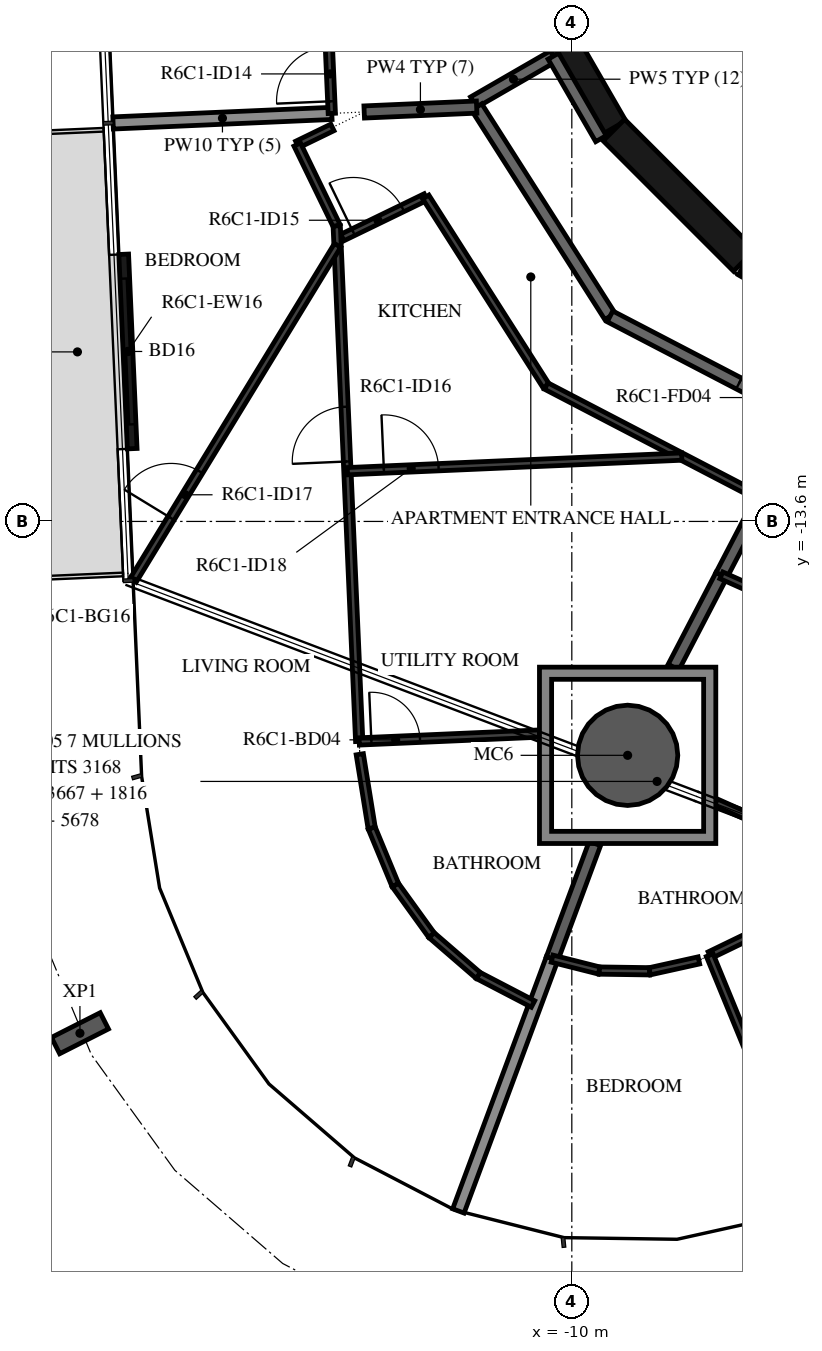
"""IFC4 building model, lengths in metres.
Left out: names, types, materials, properties, quantities, classifications, styles, units other than length and angle.
Written with IfcOpenShell. Run it as: python <this file> out.ifc"""

import sys

from ifc_helpers import new_model, si_unit, direction, frame, frame_2d, origin, origin_2d, place, context, subcontext, project, spatial, polyline, rectangle, hollow_circle, i_section, outline, extrude, element, fill, save


model = new_model("IFC4")
c1 = context("Model", 3, precision=1e-05, world=origin(), true_north=direction((0.0, 1.0)))
c2 = subcontext(c1, "Body", "Model", "MODEL_VIEW")
j1 = project(units=[si_unit("LENGTHUNIT", "METRE"), si_unit("PLANEANGLEUNIT", "RADIAN")], contexts=[c1])
p1 = place(None, origin())
s1 = spatial("IfcSite", under=j1, at=p1, CompositionType="ELEMENT")
p2 = place(p1, origin())
s2 = spatial("IfcBuilding", under=s1, at=p2, CompositionType="ELEMENT")
p3 = place(p2, frame((0.0, 0.0, 251.2)))
s3 = spatial("IfcBuildingStorey", under=s2, at=p3, CompositionType="ELEMENT", Elevation=251.2)
p4 = place(p3, frame((-9.082, -17.446, -0.38), z_axis=(0.0, 0.0, 1.0), x_axis=(1.0, 0.0, 0.0)))
e1 = element("IfcColumn", 1, at=p4, inside=s3, PredefinedType="COLUMN", context=c2, shape_type="SweptSolid", body=[
    extrude(hollow_circle(Radius=0.825, WallThickness=0.04, at=origin_2d()), origin(), (0.0, 0.0, 1.0), 3.5),
])
p5 = place(p3, frame((-18.089, -22.016, -0.38), z_axis=(0.0, 0.0, 1.0), x_axis=(-0.452473836659, 0.89177767809, 0.0)))
e2 = element("IfcColumn", 2, at=p5, inside=s3, PredefinedType="COLUMN", context=c2, shape_type="SweptSolid", body=[
    extrude(i_section(OverallWidth=0.3, OverallDepth=0.9, WebThickness=0.019, FlangeThickness=0.035, FilletRadius=0.03, at=origin_2d()), origin(), (0.0, 0.0, 1.0), 3.5),
])
p6 = place(p3, frame((-17.369, -9.207, 0.0), z_axis=(0.0, 0.0, 1.0), x_axis=(0.043639181999, -0.999047357133, 0.0)))
e3 = element("IfcWall", 3, at=p6, inside=s3, PredefinedType="STANDARD", context=c2, shape_type="SweptSolid", body=[
    extrude(rectangle(XDim=3.2, YDim=0.16, at=frame_2d((1.6, 0.0))), origin(), (0.0, 0.0, 1.0), 3.12),
])
p7 = place(p6, frame((0.4, 0.0, 0.0)))
e4 = element("IfcOpeningElement", 4, at=p7, cuts=e3, PredefinedType="OPENING", context=c2, shape_type="SweptSolid", body=[
    extrude(rectangle(XDim=2.4, YDim=2.4, at=frame_2d((1.2, 1.2))), frame((0.0, 0.09, 0.0), z_axis=(0.0, -1.0, 0.0), x_axis=(1.0, 0.0, 0.0)), (0.0, 0.0, 1.0), 0.18),
])
p8 = place(p3, frame((-10.845, -4.51, 0.0), z_axis=(0.0, 0.0, 1.0), x_axis=(0.500087131594, -0.865975092491, 0.0)))
e5 = element("IfcWall", 5, at=p8, inside=s3, PredefinedType="SHEAR", context=c2, shape_type="SweptSolid", body=[
    extrude(rectangle(XDim=3.033, YDim=0.5, at=frame_2d((1.516, 0.0))), origin(), (0.0, 0.0, 1.0), 3.12),
])
p9 = place(p3, frame((-9.308, -7.164, 0.0), z_axis=(0.0, 0.0, 1.0), x_axis=(0.707106781187, -0.707106781187, 0.0)))
e6 = element("IfcWall", 6, at=p9, inside=s3, PredefinedType="SHEAR", context=c2, shape_type="SweptSolid", body=[
    extrude(rectangle(XDim=3.032, YDim=0.5, at=frame_2d((1.516, 0.0))), origin(), (0.0, 0.0, 1.0), 3.12),
])
p10 = place(p3, frame((-7.137, -9.329, 0.0), z_axis=(0.0, 0.0, 1.0), x_axis=(0.865975092491, -0.500087131594, 0.0)))
e7 = element("IfcWall", 7, at=p10, inside=s3, PredefinedType="SHEAR", context=c2, shape_type="SweptSolid", body=[
    extrude(rectangle(XDim=3.033, YDim=0.5, at=frame_2d((1.516, 0.0))), origin(), (0.0, 0.0, 1.0), 3.12),
])
p11 = place(p3, frame((-10.303, -5.949, 0.0), z_axis=(0.0, 0.0, 1.0), x_axis=(-0.866043382451, -0.499968858743, 0.0)))
e8 = element("IfcWall", 8, at=p11, inside=s3, PredefinedType="STANDARD", context=c2, shape_type="SweptSolid", body=[
    extrude(rectangle(XDim=1.515, YDim=0.2, at=frame_2d((0.758, 0.0))), origin(), (0.0, 0.0, 1.0), 3.12),
])
p12 = place(p3, frame((-9.52, -7.305, 0.0), z_axis=(0.0, 0.0, 1.0), x_axis=(-0.500028278809, 0.866009076391, 0.0)))
e9 = element("IfcWall", 9, at=p12, inside=s3, PredefinedType="STANDARD", context=c2, shape_type="SweptSolid", body=[
    extrude(rectangle(XDim=1.566, YDim=0.2, at=frame_2d((0.783, 0.0))), origin(), (0.0, 0.0, 1.0), 3.12),
])
p13 = place(p3, frame((-11.565, -6.786, 0.0), z_axis=(0.0, 0.0, 1.0), x_axis=(0.537297327359, -0.843392898958, 0.0)))
e10 = element("IfcWall", 10, at=p13, inside=s3, PredefinedType="STANDARD", context=c2, shape_type="SweptSolid", body=[
    extrude(rectangle(XDim=4.081, YDim=0.2, at=frame_2d((2.041, 0.0))), origin(), (0.0, 0.0, 1.0), 3.12),
])
p14 = place(p3, frame((-9.372, -10.228, 0.0), z_axis=(0.0, 0.0, 1.0), x_axis=(0.887005184532, -0.461759464021, 0.0)))
e11 = element("IfcWall", 11, at=p14, inside=s3, PredefinedType="STANDARD", context=c2, shape_type="SweptSolid", body=[
    extrude(rectangle(XDim=7.181, YDim=0.2, at=frame_2d((3.591, 0.0))), origin(), (0.0, 0.0, 1.0), 3.12),
])
p15 = place(p14, frame((2.391, 0.0, 0.0)))
e12 = element("IfcOpeningElement", 12, at=p15, cuts=e11, PredefinedType="OPENING", context=c2, shape_type="SweptSolid", body=[
    extrude(rectangle(XDim=1.0, YDim=2.1, at=frame_2d((0.5, 1.05))), frame((0.0, 0.11, 0.0), z_axis=(0.0, -1.0, 0.0), x_axis=(1.0, 0.0, 0.0)), (0.0, 0.0, 1.0), 0.22),
])
p16 = place(p3, frame((-17.544, -7.047, 0.0), z_axis=(0.0, 0.0, 1.0), x_axis=(0.999045894436, 0.043672655174, 0.0)))
e13 = element("IfcWall", 13, at=p16, inside=s3, PredefinedType="STANDARD", context=c2, shape_type="SweptSolid", body=[
    extrude(rectangle(XDim=3.6, YDim=0.2, at=frame_2d((1.8, 0.0))), origin(), (0.0, 0.0, 1.0), 2.73),
])
p17 = place(p3, frame((-13.414, -6.867, 0.0), z_axis=(0.0, 0.0, 1.0), x_axis=(0.999046427216, 0.043660465726, 0.0)))
e14 = element("IfcWall", 14, at=p17, inside=s3, PredefinedType="STANDARD", context=c2, shape_type="SweptSolid", body=[
    extrude(rectangle(XDim=1.851, YDim=0.2, at=frame_2d((0.925, 0.0))), origin(), (0.0, 0.0, 1.0), 3.12),
])
p18 = place(p3, frame((-7.541, -14.486, 0.0), z_axis=(0.0, 0.0, 1.0), x_axis=(0.461746051786, 0.88701216658, 0.0)))
e15 = element("IfcWall", 15, at=p18, inside=s3, PredefinedType="STANDARD", context=c2, shape_type="SweptSolid", body=[
    extrude(rectangle(XDim=2.931, YDim=0.2, at=frame_2d((1.466, 0.0))), origin(), (0.0, 0.0, 1.0), 3.12),
])
p19 = place(p3, frame((-11.865, -24.939, 0.0), z_axis=(0.0, 0.0, 1.0), x_axis=(0.348214227297, 0.937414983829, 0.0)))
e16 = element("IfcWall", 16, at=p19, inside=s3, PredefinedType="STANDARD", context=c2, shape_type="SweptSolid", body=[
    extrude(rectangle(XDim=4.426, YDim=0.2, at=frame_2d((2.213, 0.0))), origin(), (0.0, 0.0, 1.0), 2.73),
])
p20 = place(p3, frame((-8.327, -15.996, 0.0), z_axis=(0.0, 0.0, 1.0), x_axis=(0.461722915657, 0.887024210017, 0.0)))
e17 = element("IfcWall", 17, at=p20, inside=s3, PredefinedType="STANDARD", context=c2, shape_type="SweptSolid", body=[
    extrude(rectangle(XDim=1.703, YDim=0.2, at=frame_2d((0.851, 0.0))), origin(), (0.0, 0.0, 1.0), 3.12),
])
p21 = place(p3, frame((-10.324, -20.79, 0.0), z_axis=(0.0, 0.0, 1.0), x_axis=(0.348313973933, 0.937377925686, 0.0)))
e18 = element("IfcWall", 18, at=p21, inside=s3, PredefinedType="STANDARD", context=c2, shape_type="SweptSolid", body=[
    extrude(rectangle(XDim=2.02, YDim=0.2, at=frame_2d((1.01, 0.0))), origin(), (0.0, 0.0, 1.0), 3.12),
])
p22 = place(p3, frame((-13.947, -6.89, 0.0), z_axis=(0.0, 0.0, 1.0), x_axis=(-0.043680814195, 0.999045537737, 0.0)))
e19 = element("IfcWall", 19, at=p22, inside=s3, PredefinedType="PARTITIONING", context=c2, shape_type="SweptSolid", body=[
    extrude(rectangle(XDim=2.392, YDim=0.12, at=frame_2d((1.196, 0.0))), origin(), (0.0, 0.0, 1.0), 3.12),
])
p23 = place(p22, frame((0.2, 0.0, 0.0)))
e20 = element("IfcOpeningElement", 20, at=p23, cuts=e19, PredefinedType="OPENING", context=c2, shape_type="SweptSolid", body=[
    extrude(rectangle(XDim=0.9, YDim=2.1, at=frame_2d((0.45, 1.05))), frame((0.0, 0.07, 0.0), z_axis=(0.0, -1.0, 0.0), x_axis=(1.0, 0.0, 0.0)), (0.0, 0.0, 1.0), 0.14),
])
p24 = place(p3, frame((-13.937, -7.121, 0.0), z_axis=(0.0, 0.0, 1.0), x_axis=(-0.899601864835, -0.436710985418, 0.0)))
e21 = element("IfcWall", 21, at=p24, inside=s3, PredefinedType="PARTITIONING", context=c2, shape_type="SweptSolid", body=[
    extrude(rectangle(XDim=0.644, YDim=0.12, at=frame_2d((0.322, 0.0))), origin(), (0.0, 0.0, 1.0), 3.12),
])
p25 = place(p3, frame((-14.516, -7.402, 0.0), z_axis=(0.0, 0.0, 1.0), x_axis=(0.436676244377, -0.899618729016, 0.0)))
e22 = element("IfcWall", 22, at=p25, inside=s3, PredefinedType="PARTITIONING", context=c2, shape_type="SweptSolid", body=[
    extrude(rectangle(XDim=1.487, YDim=0.12, at=frame_2d((0.744, 0.0))), origin(), (0.0, 0.0, 1.0), 3.12),
])
p26 = place(p3, frame((-13.773, -8.931, 0.0), z_axis=(0.0, 0.0, 1.0), x_axis=(0.899585443678, 0.436744810527, 0.0)))
e23 = element("IfcWall", 23, at=p26, inside=s3, PredefinedType="PARTITIONING", context=c2, shape_type="SweptSolid", body=[
    extrude(rectangle(XDim=1.525, YDim=0.12, at=frame_2d((0.762, 0.0))), origin(), (0.0, 0.0, 1.0), 3.12),
])
p27 = place(p26, frame((0.2, 0.0, 0.0)))
e24 = element("IfcOpeningElement", 24, at=p27, cuts=e23, PredefinedType="OPENING", context=c2, shape_type="SweptSolid", body=[
    extrude(rectangle(XDim=0.9, YDim=2.1, at=frame_2d((0.45, 1.05))), frame((0.0, 0.07, 0.0), z_axis=(0.0, -1.0, 0.0), x_axis=(1.0, 0.0, 0.0)), (0.0, 0.0, 1.0), 0.14),
])
p28 = place(p3, frame((-12.402, -8.265, 0.0), z_axis=(0.0, 0.0, 1.0), x_axis=(0.537321213777, -0.843377681247, 0.0)))
e25 = element("IfcWall", 25, at=p28, inside=s3, PredefinedType="PARTITIONING", context=c2, shape_type="SweptSolid", body=[
    extrude(rectangle(XDim=3.685, YDim=0.12, at=frame_2d((1.843, 0.0))), origin(), (0.0, 0.0, 1.0), 3.12),
])
p29 = place(p3, frame((-10.421, -11.373, 0.0), z_axis=(0.0, 0.0, 1.0), x_axis=(0.887012970857, -0.461744506769, 0.0)))
e26 = element("IfcWall", 26, at=p29, inside=s3, PredefinedType="PARTITIONING", context=c2, shape_type="SweptSolid", body=[
    extrude(rectangle(XDim=7.985, YDim=0.12, at=frame_2d((3.992, 0.0))), origin(), (0.0, 0.0, 1.0), 3.12),
])
p30 = place(p29, frame((4.192, 0.0, 0.0)))
e27 = element("IfcOpeningElement", 27, at=p30, cuts=e26, PredefinedType="OPENING", context=c2, shape_type="SweptSolid", body=[
    extrude(rectangle(XDim=0.9, YDim=2.1, at=frame_2d((0.45, 1.05))), frame((0.0, 0.07, 0.0), z_axis=(0.0, -1.0, 0.0), x_axis=(1.0, 0.0, 0.0)), (0.0, 0.0, 1.0), 0.14),
])
p31 = place(p3, frame((-13.496, -17.218, 0.0), z_axis=(0.0, 0.0, 1.0), x_axis=(-0.043640714674, 0.999047290183, 0.0)))
e28 = element("IfcWall", 28, at=p31, inside=s3, PredefinedType="PARTITIONING", context=c2, shape_type="SweptSolid", body=[
    extrude(rectangle(XDim=8.487, YDim=0.12, at=frame_2d((4.243, 0.0))), origin(), (0.0, 0.0, 1.0), 3.12),
])
p32 = place(p31, frame((4.608, 0.0, 0.0)))
e29 = element("IfcOpeningElement", 29, at=p32, cuts=e28, PredefinedType="OPENING", context=c2, shape_type="SweptSolid", body=[
    extrude(rectangle(XDim=0.9, YDim=2.1, at=frame_2d((0.45, 1.05))), frame((0.0, 0.07, 0.0), z_axis=(0.0, -1.0, 0.0), x_axis=(1.0, 0.0, 0.0)), (0.0, 0.0, 1.0), 0.14),
])
p33 = place(p3, frame((-17.215, -14.57, 0.0), z_axis=(0.0, 0.0, 1.0), x_axis=(0.520949659667, 0.853587401555, 0.0)))
e30 = element("IfcWall", 30, at=p33, inside=s3, PredefinedType="PARTITIONING", context=c2, shape_type="SweptSolid", body=[
    extrude(rectangle(XDim=6.455, YDim=0.12, at=frame_2d((3.228, 0.0))), origin(), (0.0, 0.0, 1.0), 3.12),
])
p34 = place(p33, frame((1.2, 0.0, 0.0)))
e31 = element("IfcOpeningElement", 31, at=p34, cuts=e30, PredefinedType="OPENING", context=c2, shape_type="SweptSolid", body=[
    extrude(rectangle(XDim=0.9, YDim=2.1, at=frame_2d((0.45, 1.05))), frame((0.0, 0.07, 0.0), z_axis=(0.0, -1.0, 0.0), x_axis=(1.0, 0.0, 0.0)), (0.0, 0.0, 1.0), 0.14),
])
p35 = place(p3, frame((-13.69, -12.774, 0.0), z_axis=(0.0, 0.0, 1.0), x_axis=(0.999048778431, 0.043606631553, 0.0)))
e32 = element("IfcWall", 32, at=p35, inside=s3, PredefinedType="PARTITIONING", context=c2, shape_type="SweptSolid", body=[
    extrude(rectangle(XDim=5.503, YDim=0.12, at=frame_2d((2.752, 0.0))), origin(), (0.0, 0.0, 1.0), 3.12),
])
p36 = place(p35, frame((0.6, 0.0, 0.0)))
e33 = element("IfcOpeningElement", 33, at=p36, cuts=e32, PredefinedType="OPENING", context=c2, shape_type="SweptSolid", body=[
    extrude(rectangle(XDim=0.9, YDim=2.1, at=frame_2d((0.45, 1.05))), frame((0.0, 0.07, 0.0), z_axis=(0.0, -1.0, 0.0), x_axis=(1.0, 0.0, 0.0)), (0.0, 0.0, 1.0), 0.14),
])
for number, where, z_axis, x_axis in (
    (34, (-10.638, -21.536, 0.0), (0.0, 0.0, 1.0), (-0.887, 0.462, 0.0)),
    (35, (-11.539, -21.067, 0.0), (0.0, 0.0, 1.0), (-0.757, 0.654, 0.0)),
    (36, (-12.308, -20.402, 0.0), (0.0, 0.0, 1.0), (-0.585, 0.811, 0.0)),
):
    element("IfcWall", number, at=place(p3, frame(where, z_axis=z_axis, x_axis=x_axis)), inside=s3, PredefinedType="PARTITIONING", context=c2, shape_type="SweptSolid", body=[
        extrude(rectangle(XDim=1.016, YDim=0.12, at=frame_2d((0.508, 0.0))), origin(), (0.0, 0.0, 1.0), 3.12),
    ])
p37 = place(p3, frame((-12.903, -19.579, 0.0), z_axis=(0.0, 0.0, 1.0), x_axis=(-0.382754975976, 0.923849894932, 0.0)))
e37 = element("IfcWall", 37, at=p37, inside=s3, PredefinedType="PARTITIONING", context=c2, shape_type="SweptSolid", body=[
    extrude(rectangle(XDim=1.016, YDim=0.12, at=frame_2d((0.508, 0.0))), origin(), (0.0, 0.0, 1.0), 3.12),
])
p38 = place(p3, frame((-13.292, -18.64, 0.0), z_axis=(0.0, 0.0, 1.0), x_axis=(-0.159363796836, 0.98721992497, 0.0)))
e38 = element("IfcWall", 38, at=p38, inside=s3, PredefinedType="PARTITIONING", context=c2, shape_type="SweptSolid", body=[
    extrude(rectangle(XDim=1.227, YDim=0.12, at=frame_2d((0.614, 0.0))), origin(), (0.0, 0.0, 1.0), 3.12),
])
p39 = place(p3, frame((-13.496, -17.218, 0.0), z_axis=(0.0, 0.0, 1.0), x_axis=(0.999044946677, 0.043694330507, 0.0)))
e39 = element("IfcWall", 39, at=p39, inside=s3, PredefinedType="PARTITIONING", context=c2, shape_type="SweptSolid", body=[
    extrude(rectangle(XDim=2.967, YDim=0.12, at=frame_2d((1.483, 0.0))), origin(), (0.0, 0.0, 1.0), 3.12),
])
p40 = place(p39, frame((0.2, 0.0, 0.0)))
e40 = element("IfcOpeningElement", 40, at=p40, cuts=e39, PredefinedType="OPENING", context=c2, shape_type="SweptSolid", body=[
    extrude(rectangle(XDim=0.8, YDim=2.1, at=frame_2d((0.4, 1.05))), frame((0.0, 0.07, 0.0), z_axis=(0.0, -1.0, 0.0), x_axis=(1.0, 0.0, 0.0)), (0.0, 0.0, 1.0), 0.14),
])
p41 = place(p3, frame((-10.324, -20.79, 0.0), z_axis=(0.0, 0.0, 1.0), x_axis=(0.969547579982, -0.244903021933, 0.0)))
e41 = element("IfcWall", 41, at=p41, inside=s3, PredefinedType="PARTITIONING", context=c2, shape_type="SweptSolid", body=[
    extrude(rectangle(XDim=0.801, YDim=0.12, at=frame_2d((0.4, 0.0))), origin(), (0.0, 0.0, 1.0), 3.12),
])
p42 = place(p3, frame((-9.548, -20.986, 0.0), z_axis=(0.0, 0.0, 1.0), x_axis=(0.999895921986, -0.014427237979, 0.0)))
e42 = element("IfcWall", 42, at=p42, inside=s3, PredefinedType="PARTITIONING", context=c2, shape_type="SweptSolid", body=[
    extrude(rectangle(XDim=0.829, YDim=0.12, at=frame_2d((0.415, 0.0))), origin(), (0.0, 0.0, 1.0), 3.12),
])
p43 = place(p3, frame((-8.719, -20.998, 0.0), z_axis=(0.0, 0.0, 1.0), x_axis=(0.976339323235, 0.216244134959, 0.0)))
e43 = element("IfcWall", 43, at=p43, inside=s3, PredefinedType="PARTITIONING", context=c2, shape_type="SweptSolid", body=[
    extrude(rectangle(XDim=0.829, YDim=0.12, at=frame_2d((0.414, 0.0))), origin(), (0.0, 0.0, 1.0), 3.12),
])
p44 = place(p3, frame((-5.256, -19.278, 0.0), z_axis=(0.0, 0.0, 1.0), x_axis=(-0.913284429849, 0.407322415532, 0.0)))
e44 = element("IfcWall", 44, at=p44, inside=s3, PredefinedType="PARTITIONING", context=c2, shape_type="SweptSolid", body=[
    extrude(rectangle(XDim=2.601, YDim=0.12, at=frame_2d((1.301, 0.0))), origin(), (0.0, 0.0, 1.0), 3.12),
])
p45 = place(p44, frame((0.5, 0.0, 0.0)))
e45 = element("IfcOpeningElement", 45, at=p45, cuts=e44, PredefinedType="OPENING", context=c2, shape_type="SweptSolid", body=[
    extrude(rectangle(XDim=0.8, YDim=2.1, at=frame_2d((0.4, 1.05))), frame((0.0, 0.07, 0.0), z_axis=(0.0, -1.0, 0.0), x_axis=(1.0, 0.0, 0.0)), (0.0, 0.0, 1.0), 0.14),
])
p46 = place(p3, frame((-7.732, -20.732, 0.0), z_axis=(0.0, 0.0, 1.0), x_axis=(0.900065466697, 0.435754696659, 0.0)))
e46 = element("IfcWall", 46, at=p46, inside=s3, PredefinedType="PARTITIONING", context=c2, shape_type="SweptSolid", body=[
    extrude(rectangle(XDim=0.889, YDim=0.12, at=frame_2d((0.445, 0.0))), origin(), (0.0, 0.0, 1.0), 3.12),
])
p47 = place(p3, frame((-6.057, -24.81, 0.0), z_axis=(0.0, 0.0, 1.0), x_axis=(-0.380044941584, 0.924968022354, 0.0)))
e47 = element("IfcWall", 47, at=p47, inside=s3, PredefinedType="PARTITIONING", context=c2, shape_type="SweptSolid", body=[
    extrude(rectangle(XDim=4.408, YDim=0.12, at=frame_2d((2.204, 0.0))), origin(), (0.0, 0.0, 1.0), 3.12),
])
p48 = place(p47, frame((0.2, 0.0, 0.0)))
e48 = element("IfcOpeningElement", 48, at=p48, cuts=e47, PredefinedType="OPENING", context=c2, shape_type="SweptSolid", body=[
    extrude(rectangle(XDim=0.9, YDim=2.1, at=frame_2d((0.45, 1.05))), frame((0.0, 0.07, 0.0), z_axis=(0.0, -1.0, 0.0), x_axis=(1.0, 0.0, 0.0)), (0.0, 0.0, 1.0), 0.14),
])
p49 = place(p3, frame((-1.773, -17.059, 0.0), z_axis=(0.0, 0.0, 1.0), x_axis=(-0.913279926902, 0.407332511736, 0.0)))
e49 = element("IfcWall", 49, at=p49, inside=s3, PredefinedType="PARTITIONING", context=c2, shape_type="SweptSolid", body=[
    extrude(rectangle(XDim=6.315, YDim=0.12, at=frame_2d((3.158, 0.0))), origin(), (0.0, 0.0, 1.0), 3.12),
])
p50 = place(p49, frame((0.5, 0.0, 0.0)))
e50 = element("IfcOpeningElement", 50, at=p50, cuts=e49, PredefinedType="OPENING", context=c2, shape_type="SweptSolid", body=[
    extrude(rectangle(XDim=0.9, YDim=2.1, at=frame_2d((0.45, 1.05))), frame((0.0, 0.07, 0.0), z_axis=(0.0, -1.0, 0.0), x_axis=(1.0, 0.0, 0.0)), (0.0, 0.0, 1.0), 0.14),
])
p51 = place(p3, origin())
e51 = element("IfcWall", 51, at=p51, inside=s3, PredefinedType="STANDARD", context=c2, shape_type="SweptSolid", body=[
    extrude(outline(polyline([(-7.632, -15.996), (-7.632, -18.896), (-10.532, -18.896), (-10.532, -15.996), (-7.632, -15.996)]), holes=[polyline([(-10.332, -18.696), (-7.832, -18.696), (-7.832, -16.196), (-10.332, -16.196), (-10.332, -18.696)])]), origin(), (0.0, 0.0, 1.0), 3.12),
])
p52 = place(p7, origin())
e52 = element("IfcDoor", 52, at=p52, inside=s3, OperationType="DOUBLE_DOOR_SLIDING", PredefinedType="DOOR", context=c2, shape_type="SweptSolid", body=[
    extrude(rectangle(XDim=2.4, YDim=2.4, at=frame_2d((1.2, 1.2))), frame((0.0, 0.025, 0.0), z_axis=(0.0, -1.0, 0.0), x_axis=(1.0, 0.0, 0.0)), (0.0, 0.0, 1.0), 0.05),
])
fill(e4, e52)
p53 = place(p23, origin())
e53 = element("IfcDoor", 53, at=p53, inside=s3, OperationType="SINGLE_SWING_LEFT", PredefinedType="DOOR", context=c2, shape_type="SweptSolid", body=[
    extrude(rectangle(XDim=0.9, YDim=2.1, at=frame_2d((0.45, 1.05))), frame((0.0, 0.025, 0.0), z_axis=(0.0, -1.0, 0.0), x_axis=(1.0, 0.0, 0.0)), (0.0, 0.0, 1.0), 0.05),
])
fill(e20, e53)
p54 = place(p15, origin())
e54 = element("IfcDoor", 54, at=p54, inside=s3, OperationType="SINGLE_SWING_RIGHT", PredefinedType="DOOR", context=c2, shape_type="SweptSolid", body=[
    extrude(rectangle(XDim=1.0, YDim=2.1, at=frame_2d((0.5, 1.05))), frame((0.0, 0.025, 0.0), z_axis=(0.0, -1.0, 0.0), x_axis=(1.0, 0.0, 0.0)), (0.0, 0.0, 1.0), 0.05),
])
fill(e12, e54)
p55 = place(p27, origin())
e55 = element("IfcDoor", 55, at=p55, inside=s3, OperationType="SINGLE_SWING_LEFT", PredefinedType="DOOR", context=c2, shape_type="SweptSolid", body=[
    extrude(rectangle(XDim=0.9, YDim=2.1, at=frame_2d((0.45, 1.05))), frame((0.0, 0.025, 0.0), z_axis=(0.0, -1.0, 0.0), x_axis=(1.0, 0.0, 0.0)), (0.0, 0.0, 1.0), 0.05),
])
fill(e24, e55)
p56 = place(p32, origin())
e56 = element("IfcDoor", 56, at=p56, inside=s3, OperationType="SINGLE_SWING_RIGHT", PredefinedType="DOOR", context=c2, shape_type="SweptSolid", body=[
    extrude(rectangle(XDim=0.9, YDim=2.1, at=frame_2d((0.45, 1.05))), frame((0.0, 0.025, 0.0), z_axis=(0.0, -1.0, 0.0), x_axis=(1.0, 0.0, 0.0)), (0.0, 0.0, 1.0), 0.05),
])
fill(e29, e56)
p57 = place(p34, origin())
e57 = element("IfcDoor", 57, at=p57, inside=s3, OperationType="SINGLE_SWING_LEFT", PredefinedType="DOOR", context=c2, shape_type="SweptSolid", body=[
    extrude(rectangle(XDim=0.9, YDim=2.1, at=frame_2d((0.45, 1.05))), frame((0.0, 0.025, 0.0), z_axis=(0.0, -1.0, 0.0), x_axis=(1.0, 0.0, 0.0)), (0.0, 0.0, 1.0), 0.05),
])
fill(e31, e57)
p58 = place(p36, origin())
e58 = element("IfcDoor", 58, at=p58, inside=s3, OperationType="SINGLE_SWING_RIGHT", PredefinedType="DOOR", context=c2, shape_type="SweptSolid", body=[
    extrude(rectangle(XDim=0.9, YDim=2.1, at=frame_2d((0.45, 1.05))), frame((0.0, 0.025, 0.0), z_axis=(0.0, -1.0, 0.0), x_axis=(1.0, 0.0, 0.0)), (0.0, 0.0, 1.0), 0.05),
])
fill(e33, e58)
p59 = place(p40, origin())
e59 = element("IfcDoor", 59, at=p59, inside=s3, OperationType="SINGLE_SWING_RIGHT", PredefinedType="DOOR", context=c2, shape_type="SweptSolid", body=[
    extrude(rectangle(XDim=0.8, YDim=2.1, at=frame_2d((0.4, 1.05))), frame((0.0, 0.025, 0.0), z_axis=(0.0, -1.0, 0.0), x_axis=(1.0, 0.0, 0.0)), (0.0, 0.0, 1.0), 0.05),
])
fill(e40, e59)
save(model, sys.argv[1])
